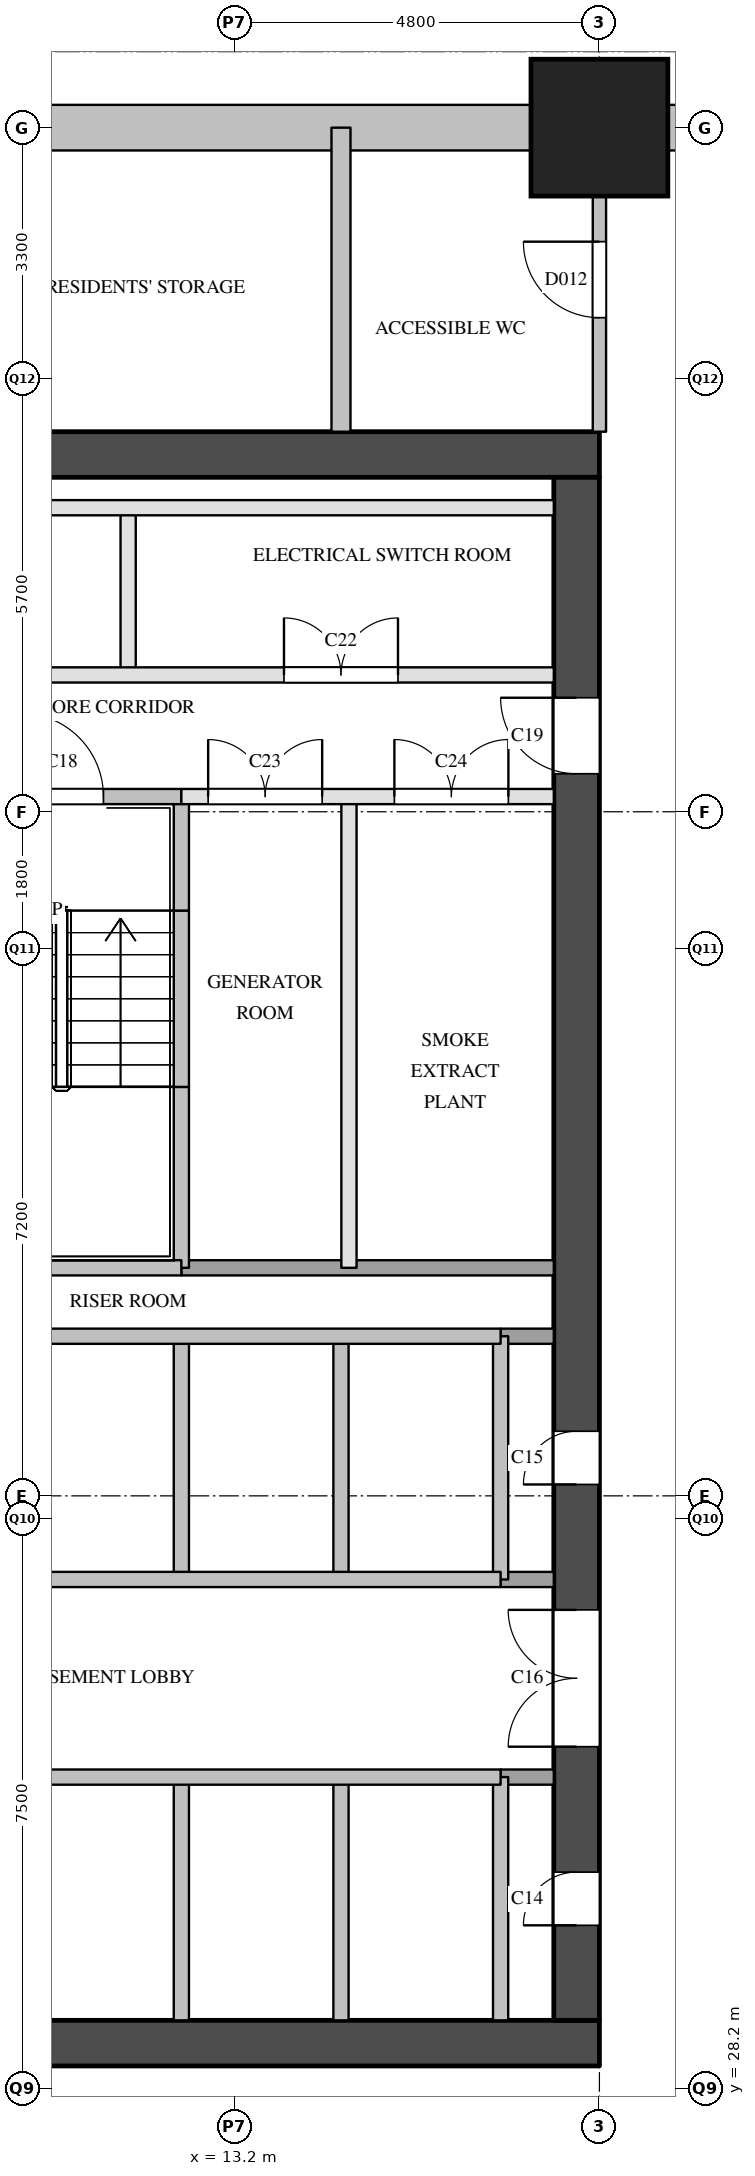
"""IFC4 building model, lengths in metres.
Left out: names, types, materials, properties, quantities, classifications, styles, units other than length and angle.
Written with IfcOpenShell. Run it as: python <this file> out.ifc"""

import sys

from ifc_helpers import new_model, si_unit, direction, frame, frame_2d, origin, origin_2d, place, context, subcontext, project, spatial, rectangle, extrude, element, fill, save


model = new_model("IFC4")
c1 = context("Model", 3, precision=1e-05, world=origin(), true_north=direction((0.0, 1.0)))
c2 = subcontext(c1, "Body", "Model", "MODEL_VIEW")
j1 = project(units=[si_unit("LENGTHUNIT", "METRE"), si_unit("PLANEANGLEUNIT", "RADIAN")], contexts=[c1])
p1 = place(None, origin())
s1 = spatial("IfcSite", under=j1, at=p1, CompositionType="ELEMENT")
p2 = place(p1, origin())
s2 = spatial("IfcBuilding", under=s1, at=p2, CompositionType="ELEMENT")
p3 = place(p2, frame((0.0, 0.0, -6.0)))
s3 = spatial("IfcBuildingStorey", under=s2, at=p3, CompositionType="ELEMENT", Elevation=-6.0)
p4 = place(p3, frame((18.0, 54.0, 0.0), z_axis=(0.0, 0.0, 1.0), x_axis=(1.0, 0.0, 0.0)))
e1 = element("IfcColumn", 1, at=p4, inside=s3, PredefinedType="COLUMN", context=c2, shape_type="SweptSolid", body=[
    extrude(rectangle(XDim=1.8, YDim=1.8, at=origin_2d()), origin(), (0.0, 0.0, 1.0), 6.0),
])
for number, where, z_axis, x_axis in (
    (2, (26.1, 54.0, 0.0), (0.0, 0.0, 1.0), (-1.0, 0.0, 0.0)),
    (3, (17.1, 54.0, 0.0), (0.0, 0.0, 1.0), (-1.0, 0.0, 0.0)),
):
    element("IfcWall", number, at=place(p3, frame(where, z_axis=z_axis, x_axis=x_axis)), inside=s3, PredefinedType="SOLIDWALL", context=c2, shape_type="SweptSolid", body=[
        extrude(rectangle(XDim=7.2, YDim=0.6, at=frame_2d((3.6, 0.0))), origin(), (0.0, 0.0, 1.0), 5.59),
    ])
for number, where, z_axis, x_axis in (
    (4, (5.6, 28.8, 0.0), (0.0, 0.0, 1.0), (1.0, 0.0, 0.0)),
    (5, (5.6, 49.7, 0.0), (0.0, 0.0, 1.0), (1.0, 0.0, 0.0)),
):
    element("IfcWall", number, at=place(p3, frame(where, z_axis=z_axis, x_axis=x_axis)), inside=s3, PredefinedType="SHEAR", context=c2, shape_type="SweptSolid", body=[
        extrude(rectangle(XDim=12.4, YDim=0.6, at=frame_2d((6.2, 0.0))), origin(), (0.0, 0.0, 1.0), 5.59),
    ])
p5 = place(p3, frame((17.7, 29.1, 0.0), z_axis=(0.0, 0.0, 1.0), x_axis=(0.0, 1.0, 0.0)))
e6 = element("IfcWall", 6, at=p5, inside=s3, PredefinedType="SHEAR", context=c2, shape_type="SweptSolid", body=[
    extrude(rectangle(XDim=20.3, YDim=0.6, at=frame_2d((10.15, 0.0))), origin(), (0.0, 0.0, 1.0), 5.59),
])
p6 = place(p5, frame((1.25, 0.0, 0.0)))
e7 = element("IfcOpeningElement", 7, at=p6, cuts=e6, PredefinedType="OPENING", context=c2, shape_type="SweptSolid", body=[
    extrude(rectangle(XDim=0.7, YDim=2.1, at=frame_2d((0.35, 1.05))), frame((0.0, 0.31, 0.0), z_axis=(0.0, -1.0, 0.0), x_axis=(1.0, 0.0, 0.0)), (0.0, 0.0, 1.0), 0.62),
])
p7 = place(p5, frame((7.05, 0.0, 0.0)))
e8 = element("IfcOpeningElement", 8, at=p7, cuts=e6, PredefinedType="OPENING", context=c2, shape_type="SweptSolid", body=[
    extrude(rectangle(XDim=0.7, YDim=2.1, at=frame_2d((0.35, 1.05))), frame((0.0, 0.31, 0.0), z_axis=(0.0, -1.0, 0.0), x_axis=(1.0, 0.0, 0.0)), (0.0, 0.0, 1.0), 0.62),
])
p8 = place(p5, frame((3.6, 0.0, 0.0)))
e9 = element("IfcOpeningElement", 9, at=p8, cuts=e6, PredefinedType="OPENING", context=c2, shape_type="SweptSolid", body=[
    extrude(rectangle(XDim=1.8, YDim=2.1, at=frame_2d((0.9, 1.05))), frame((0.0, 0.31, 0.0), z_axis=(0.0, -1.0, 0.0), x_axis=(1.0, 0.0, 0.0)), (0.0, 0.0, 1.0), 0.62),
])
p9 = place(p5, frame((16.4, 0.0, 0.0)))
e10 = element("IfcOpeningElement", 10, at=p9, cuts=e6, PredefinedType="OPENING", context=c2, shape_type="SweptSolid", body=[
    extrude(rectangle(XDim=1.0, YDim=2.1, at=frame_2d((0.5, 1.05))), frame((0.0, 0.31, 0.0), z_axis=(0.0, -1.0, 0.0), x_axis=(1.0, 0.0, 0.0)), (0.0, 0.0, 1.0), 0.62),
])
p10 = place(p3, frame((11.8, 46.8, 0.0), z_axis=(0.0, 0.0, 1.0), x_axis=(0.0, 1.0, 0.0)))
e11 = element("IfcWall", 11, at=p10, inside=s3, PredefinedType="PARTITIONING", context=c2, shape_type="SweptSolid", body=[
    extrude(rectangle(XDim=2.2, YDim=0.2, at=frame_2d((1.1, 0.0))), origin(), (0.0, 0.0, 1.0), 5.59),
])
p11 = place(p3, frame((12.5, 29.1, 0.0), z_axis=(0.0, 0.0, 1.0), x_axis=(0.0, 1.0, 0.0)))
e12 = element("IfcWall", 12, at=p11, inside=s3, PredefinedType="SOLIDWALL", context=c2, shape_type="SweptSolid", body=[
    extrude(rectangle(XDim=3.2, YDim=0.2, at=frame_2d((1.6, 0.0))), origin(), (0.0, 0.0, 1.0), 5.59),
])
p12 = place(p3, frame((12.5, 34.9, 0.0), z_axis=(0.0, 0.0, 1.0), x_axis=(0.0, 1.0, 0.0)))
e13 = element("IfcWall", 13, at=p12, inside=s3, PredefinedType="SOLIDWALL", context=c2, shape_type="SweptSolid", body=[
    extrude(rectangle(XDim=3.2, YDim=0.2, at=frame_2d((1.6, 0.0))), origin(), (0.0, 0.0, 1.0), 5.59),
])
p13 = place(p3, frame((12.5, 39.0, 0.0), z_axis=(0.0, 0.0, 1.0), x_axis=(0.0, 1.0, 0.0)))
e14 = element("IfcWall", 14, at=p13, inside=s3, PredefinedType="SOLIDWALL", context=c2, shape_type="SweptSolid", body=[
    extrude(rectangle(XDim=2.38, YDim=0.2, at=frame_2d((1.19, 0.0))), origin(), (0.0, 0.0, 1.0), 5.59),
])
p14 = place(p3, frame((12.5, 41.38, 0.0), z_axis=(0.0, 0.0, 1.0), x_axis=(0.0, 1.0, 0.0)))
e15 = element("IfcWall", 15, at=p14, inside=s3, PredefinedType="SOLIDWALL", context=c2, shape_type="SweptSolid", body=[
    extrude(rectangle(XDim=2.32, YDim=0.2, at=frame_2d((1.16, 0.0))), origin(), (0.0, 0.0, 1.0), 5.59),
])
p15 = place(p3, frame((12.5, 43.7, 0.0), z_axis=(0.0, 0.0, 1.0), x_axis=(0.0, 1.0, 0.0)))
e16 = element("IfcWall", 16, at=p15, inside=s3, PredefinedType="SOLIDWALL", context=c2, shape_type="SweptSolid", body=[
    extrude(rectangle(XDim=1.5, YDim=0.2, at=frame_2d((0.75, 0.0))), origin(), (0.0, 0.0, 1.0), 5.59),
])
p16 = place(p3, frame((14.6, 29.1, 0.0), z_axis=(0.0, 0.0, 1.0), x_axis=(0.0, 1.0, 0.0)))
e17 = element("IfcWall", 17, at=p16, inside=s3, PredefinedType="SOLIDWALL", context=c2, shape_type="SweptSolid", body=[
    extrude(rectangle(XDim=3.2, YDim=0.2, at=frame_2d((1.6, 0.0))), origin(), (0.0, 0.0, 1.0), 5.59),
])
p17 = place(p3, frame((14.6, 34.9, 0.0), z_axis=(0.0, 0.0, 1.0), x_axis=(0.0, 1.0, 0.0)))
e18 = element("IfcWall", 18, at=p17, inside=s3, PredefinedType="SOLIDWALL", context=c2, shape_type="SweptSolid", body=[
    extrude(rectangle(XDim=3.2, YDim=0.2, at=frame_2d((1.6, 0.0))), origin(), (0.0, 0.0, 1.0), 5.59),
])
p18 = place(p3, frame((14.705, 39.0, 0.0), z_axis=(0.0, 0.0, 1.0), x_axis=(0.0, 1.0, 0.0)))
e19 = element("IfcWall", 19, at=p18, inside=s3, PredefinedType="PARTITIONING", context=c2, shape_type="SweptSolid", body=[
    extrude(rectangle(XDim=6.2, YDim=0.2, at=frame_2d((3.1, 0.0))), origin(), (0.0, 0.0, 1.0), 5.59),
])
p19 = place(p3, frame((16.7, 29.1, 0.0), z_axis=(0.0, 0.0, 1.0), x_axis=(0.0, 1.0, 0.0)))
e20 = element("IfcWall", 20, at=p19, inside=s3, PredefinedType="SOLIDWALL", context=c2, shape_type="SweptSolid", body=[
    extrude(rectangle(XDim=3.2, YDim=0.2, at=frame_2d((1.6, 0.0))), origin(), (0.0, 0.0, 1.0), 5.59),
])
p20 = place(p3, frame((16.7, 34.9, 0.0), z_axis=(0.0, 0.0, 1.0), x_axis=(0.0, 1.0, 0.0)))
e21 = element("IfcWall", 21, at=p20, inside=s3, PredefinedType="SOLIDWALL", context=c2, shape_type="SweptSolid", body=[
    extrude(rectangle(XDim=3.2, YDim=0.2, at=frame_2d((1.6, 0.0))), origin(), (0.0, 0.0, 1.0), 5.59),
])
p21 = place(p3, frame((6.2, 32.3, 0.0), z_axis=(0.0, 0.0, 1.0), x_axis=(1.0, 0.0, 0.0)))
e22 = element("IfcWall", 22, at=p21, inside=s3, PredefinedType="SOLIDWALL", context=c2, shape_type="SweptSolid", body=[
    extrude(rectangle(XDim=10.5, YDim=0.2, at=frame_2d((5.25, 0.0))), origin(), (0.0, 0.0, 1.0), 5.59),
])
p22 = place(p3, frame((16.7, 32.3, 0.0), z_axis=(0.0, 0.0, 1.0), x_axis=(1.0, 0.0, 0.0)))
e23 = element("IfcWall", 23, at=p22, inside=s3, PredefinedType="SOLIDWALL", context=c2, shape_type="SweptSolid", body=[
    extrude(rectangle(XDim=0.7, YDim=0.2, at=frame_2d((0.35, 0.0))), origin(), (0.0, 0.0, 1.0), 5.59),
])
p23 = place(p3, frame((6.2, 34.9, 0.0), z_axis=(0.0, 0.0, 1.0), x_axis=(1.0, 0.0, 0.0)))
e24 = element("IfcWall", 24, at=p23, inside=s3, PredefinedType="SOLIDWALL", context=c2, shape_type="SweptSolid", body=[
    extrude(rectangle(XDim=10.5, YDim=0.2, at=frame_2d((5.25, 0.0))), origin(), (0.0, 0.0, 1.0), 5.59),
])
p24 = place(p3, frame((16.7, 34.9, 0.0), z_axis=(0.0, 0.0, 1.0), x_axis=(1.0, 0.0, 0.0)))
e25 = element("IfcWall", 25, at=p24, inside=s3, PredefinedType="SOLIDWALL", context=c2, shape_type="SweptSolid", body=[
    extrude(rectangle(XDim=0.7, YDim=0.2, at=frame_2d((0.35, 0.0))), origin(), (0.0, 0.0, 1.0), 5.59),
])
p25 = place(p3, frame((6.2, 38.1, 0.0), z_axis=(0.0, 0.0, 1.0), x_axis=(1.0, 0.0, 0.0)))
e26 = element("IfcWall", 26, at=p25, inside=s3, PredefinedType="SOLIDWALL", context=c2, shape_type="SweptSolid", body=[
    extrude(rectangle(XDim=10.5, YDim=0.2, at=frame_2d((5.25, 0.0))), origin(), (0.0, 0.0, 1.0), 5.59),
])
p26 = place(p3, frame((16.7, 38.1, 0.0), z_axis=(0.0, 0.0, 1.0), x_axis=(1.0, 0.0, 0.0)))
e27 = element("IfcWall", 27, at=p26, inside=s3, PredefinedType="SOLIDWALL", context=c2, shape_type="SweptSolid", body=[
    extrude(rectangle(XDim=0.7, YDim=0.2, at=frame_2d((0.35, 0.0))), origin(), (0.0, 0.0, 1.0), 5.59),
])
p27 = place(p3, frame((12.5, 39.0, 0.0), z_axis=(0.0, 0.0, 1.0), x_axis=(1.0, 0.0, 0.0)))
e28 = element("IfcWall", 28, at=p27, inside=s3, PredefinedType="SOLIDWALL", context=c2, shape_type="SweptSolid", body=[
    extrude(rectangle(XDim=4.9, YDim=0.2, at=frame_2d((2.45, 0.0))), origin(), (0.0, 0.0, 1.0), 5.59),
])
p28 = place(p3, frame((9.45, 39.0, 0.0), z_axis=(0.0, 0.0, 1.0), x_axis=(1.0, 0.0, 0.0)))
e29 = element("IfcWall", 29, at=p28, inside=s3, PredefinedType="SOLIDWALL", context=c2, shape_type="SweptSolid", body=[
    extrude(rectangle(XDim=3.05, YDim=0.2, at=frame_2d((1.525, 0.0))), origin(), (0.0, 0.0, 1.0), 5.59),
])
p29 = place(p3, frame((12.5, 45.2, 0.0), z_axis=(0.0, 0.0, 1.0), x_axis=(1.0, 0.0, 0.0)))
e30 = element("IfcWall", 30, at=p29, inside=s3, PredefinedType="PARTITIONING", context=c2, shape_type="SweptSolid", body=[
    extrude(rectangle(XDim=4.9, YDim=0.2, at=frame_2d((2.45, 0.0))), origin(), (0.0, 0.0, 1.0), 5.59),
])
p30 = place(p29, frame((0.353, 0.0, 0.0)))
e31 = element("IfcOpeningElement", 31, at=p30, cuts=e30, PredefinedType="OPENING", context=c2, shape_type="SweptSolid", body=[
    extrude(rectangle(XDim=1.5, YDim=2.1, at=frame_2d((0.75, 1.05))), frame((0.0, 0.11, 0.0), z_axis=(0.0, -1.0, 0.0), x_axis=(1.0, 0.0, 0.0)), (0.0, 0.0, 1.0), 0.22),
])
p31 = place(p29, frame((2.802, 0.0, 0.0)))
e32 = element("IfcOpeningElement", 32, at=p31, cuts=e30, PredefinedType="OPENING", context=c2, shape_type="SweptSolid", body=[
    extrude(rectangle(XDim=1.5, YDim=2.1, at=frame_2d((0.75, 1.05))), frame((0.0, 0.11, 0.0), z_axis=(0.0, -1.0, 0.0), x_axis=(1.0, 0.0, 0.0)), (0.0, 0.0, 1.0), 0.22),
])
p32 = place(p3, frame((9.45, 45.2, 0.0), z_axis=(0.0, 0.0, 1.0), x_axis=(1.0, 0.0, 0.0)))
e33 = element("IfcWall", 33, at=p32, inside=s3, PredefinedType="SOLIDWALL", context=c2, shape_type="SweptSolid", body=[
    extrude(rectangle(XDim=3.05, YDim=0.2, at=frame_2d((1.525, 0.0))), origin(), (0.0, 0.0, 1.0), 5.59),
])
p33 = place(p32, frame((0.925, 0.0, 0.0)))
e34 = element("IfcOpeningElement", 34, at=p33, cuts=e33, PredefinedType="OPENING", context=c2, shape_type="SweptSolid", body=[
    extrude(rectangle(XDim=1.1, YDim=2.1, at=frame_2d((0.55, 1.05))), frame((0.0, 0.11, 0.0), z_axis=(0.0, -1.0, 0.0), x_axis=(1.0, 0.0, 0.0)), (0.0, 0.0, 1.0), 0.22),
])
p34 = place(p3, frame((6.2, 46.8, 0.0), z_axis=(0.0, 0.0, 1.0), x_axis=(1.0, 0.0, 0.0)))
e35 = element("IfcWall", 35, at=p34, inside=s3, PredefinedType="PARTITIONING", context=c2, shape_type="SweptSolid", body=[
    extrude(rectangle(XDim=11.2, YDim=0.2, at=frame_2d((5.6, 0.0))), origin(), (0.0, 0.0, 1.0), 5.59),
])
p35 = place(p34, frame((2.05, 0.0, 0.0)))
e36 = element("IfcOpeningElement", 36, at=p35, cuts=e35, PredefinedType="OPENING", context=c2, shape_type="SweptSolid", body=[
    extrude(rectangle(XDim=1.5, YDim=2.1, at=frame_2d((0.75, 1.05))), frame((0.0, 0.11, 0.0), z_axis=(0.0, -1.0, 0.0), x_axis=(1.0, 0.0, 0.0)), (0.0, 0.0, 1.0), 0.22),
])
p36 = place(p34, frame((7.65, 0.0, 0.0)))
e37 = element("IfcOpeningElement", 37, at=p36, cuts=e35, PredefinedType="OPENING", context=c2, shape_type="SweptSolid", body=[
    extrude(rectangle(XDim=1.5, YDim=2.1, at=frame_2d((0.75, 1.05))), frame((0.0, 0.11, 0.0), z_axis=(0.0, -1.0, 0.0), x_axis=(1.0, 0.0, 0.0)), (0.0, 0.0, 1.0), 0.22),
])
p37 = place(p3, frame((6.2, 49.0, 0.0), z_axis=(0.0, 0.0, 1.0), x_axis=(1.0, 0.0, 0.0)))
e38 = element("IfcWall", 38, at=p37, inside=s3, PredefinedType="PARTITIONING", context=c2, shape_type="SweptSolid", body=[
    extrude(rectangle(XDim=11.2, YDim=0.2, at=frame_2d((5.6, 0.0))), origin(), (0.0, 0.0, 1.0), 5.59),
])
p38 = place(p3, frame((18.0, 50.0, 0.0), z_axis=(0.0, 0.0, 1.0), x_axis=(0.0, 1.0, 0.0)))
e39 = element("IfcWall", 39, at=p38, inside=s3, PredefinedType="PARTITIONING", context=c2, shape_type="SweptSolid", body=[
    extrude(rectangle(XDim=4.0, YDim=0.175, at=frame_2d((2.0, 0.0))), origin(), (0.0, 0.0, 1.0), 5.59),
])
p39 = place(p38, frame((1.5, 0.0, 0.0)))
e40 = element("IfcOpeningElement", 40, at=p39, cuts=e39, PredefinedType="OPENING", context=c2, shape_type="SweptSolid", body=[
    extrude(rectangle(XDim=1.0, YDim=2.1, at=frame_2d((0.5, 1.05))), frame((0.0, 0.097, 0.0), z_axis=(0.0, -1.0, 0.0), x_axis=(1.0, 0.0, 0.0)), (0.0, 0.0, 1.0), 0.195),
])
p40 = place(p3, frame((14.6, 50.0, 0.0), z_axis=(0.0, 0.0, 1.0), x_axis=(0.0, 1.0, 0.0)))
e41 = element("IfcWall", 41, at=p40, inside=s3, PredefinedType="PARTITIONING", context=c2, shape_type="SweptSolid", body=[
    extrude(rectangle(XDim=4.0, YDim=0.25, at=frame_2d((2.0, 0.0))), origin(), (0.0, 0.0, 1.0), 5.59),
])
p41 = place(p6, origin())
e42 = element("IfcDoor", 42, at=p41, inside=s3, OperationType="SINGLE_SWING_LEFT", PredefinedType="DOOR", context=c2, shape_type="SweptSolid", body=[
    extrude(rectangle(XDim=0.7, YDim=2.1, at=frame_2d((0.35, 1.05))), frame((0.0, 0.025, 0.0), z_axis=(0.0, -1.0, 0.0), x_axis=(1.0, 0.0, 0.0)), (0.0, 0.0, 1.0), 0.05),
])
fill(e7, e42)
p42 = place(p7, origin())
e43 = element("IfcDoor", 43, at=p42, inside=s3, OperationType="SINGLE_SWING_LEFT", PredefinedType="DOOR", context=c2, shape_type="SweptSolid", body=[
    extrude(rectangle(XDim=0.7, YDim=2.1, at=frame_2d((0.35, 1.05))), frame((0.0, 0.025, 0.0), z_axis=(0.0, -1.0, 0.0), x_axis=(1.0, 0.0, 0.0)), (0.0, 0.0, 1.0), 0.05),
])
fill(e8, e43)
p43 = place(p8, origin())
e44 = element("IfcDoor", 44, at=p43, inside=s3, OperationType="DOUBLE_DOOR_SINGLE_SWING", PredefinedType="DOOR", context=c2, shape_type="SweptSolid", body=[
    extrude(rectangle(XDim=1.8, YDim=2.1, at=frame_2d((0.9, 1.05))), frame((0.0, 0.025, 0.0), z_axis=(0.0, -1.0, 0.0), x_axis=(1.0, 0.0, 0.0)), (0.0, 0.0, 1.0), 0.05),
])
fill(e9, e44)
p44 = place(p33, origin())
e45 = element("IfcDoor", 45, at=p44, inside=s3, OperationType="SINGLE_SWING_LEFT", PredefinedType="DOOR", context=c2, shape_type="SweptSolid", body=[
    extrude(rectangle(XDim=1.1, YDim=2.1, at=frame_2d((0.55, 1.05))), frame((0.0, 0.025, 0.0), z_axis=(0.0, -1.0, 0.0), x_axis=(1.0, 0.0, 0.0)), (0.0, 0.0, 1.0), 0.05),
])
fill(e34, e45)
p45 = place(p9, origin())
e46 = element("IfcDoor", 46, at=p45, inside=s3, OperationType="SINGLE_SWING_RIGHT", PredefinedType="DOOR", context=c2, shape_type="SweptSolid", body=[
    extrude(rectangle(XDim=1.0, YDim=2.1, at=frame_2d((0.5, 1.05))), frame((0.0, 0.025, 0.0), z_axis=(0.0, -1.0, 0.0), x_axis=(1.0, 0.0, 0.0)), (0.0, 0.0, 1.0), 0.05),
])
fill(e10, e46)
p46 = place(p36, origin())
e47 = element("IfcDoor", 47, at=p46, inside=s3, OperationType="DOUBLE_DOOR_SINGLE_SWING", PredefinedType="DOOR", context=c2, shape_type="SweptSolid", body=[
    extrude(rectangle(XDim=1.5, YDim=2.1, at=frame_2d((0.75, 1.05))), frame((0.0, 0.025, 0.0), z_axis=(0.0, -1.0, 0.0), x_axis=(1.0, 0.0, 0.0)), (0.0, 0.0, 1.0), 0.05),
])
fill(e37, e47)
p47 = place(p30, origin())
e48 = element("IfcDoor", 48, at=p47, inside=s3, OperationType="DOUBLE_DOOR_SINGLE_SWING", PredefinedType="DOOR", context=c2, shape_type="SweptSolid", body=[
    extrude(rectangle(XDim=1.5, YDim=2.1, at=frame_2d((0.75, 1.05))), frame((0.0, 0.025, 0.0), z_axis=(0.0, -1.0, 0.0), x_axis=(1.0, 0.0, 0.0)), (0.0, 0.0, 1.0), 0.05),
])
fill(e31, e48)
p48 = place(p31, origin())
e49 = element("IfcDoor", 49, at=p48, inside=s3, OperationType="DOUBLE_DOOR_SINGLE_SWING", PredefinedType="DOOR", context=c2, shape_type="SweptSolid", body=[
    extrude(rectangle(XDim=1.5, YDim=2.1, at=frame_2d((0.75, 1.05))), frame((0.0, 0.025, 0.0), z_axis=(0.0, -1.0, 0.0), x_axis=(1.0, 0.0, 0.0)), (0.0, 0.0, 1.0), 0.05),
])
fill(e32, e49)
p49 = place(p39, origin())
e50 = element("IfcDoor", 50, at=p49, inside=s3, OperationType="SINGLE_SWING_RIGHT", PredefinedType="DOOR", context=c2, shape_type="SweptSolid", body=[
    extrude(rectangle(XDim=1.0, YDim=2.1, at=frame_2d((0.5, 1.05))), frame((0.0, 0.025, 0.0), z_axis=(0.0, -1.0, 0.0), x_axis=(1.0, 0.0, 0.0)), (0.0, 0.0, 1.0), 0.05),
])
fill(e40, e50)
save(model, sys.argv[1])
